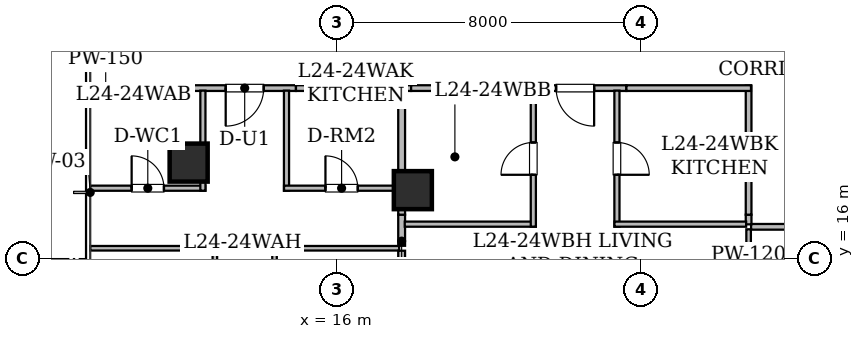
"""IFC4 building model, lengths in metres.
Left out: names, types, materials, properties, quantities, classifications, styles, units other than length and angle.
Written with IfcOpenShell. Run it as: python <this file> out.ifc"""

import sys

from ifc_helpers import new_model, si_unit, direction, frame, frame_2d, origin, origin_2d, place, context, subcontext, project, spatial, rectangle, hollow_rectangle, extrude, element, fill, save


model = new_model("IFC4")
c1 = context("Model", 3, precision=1e-05, world=origin(), true_north=direction((0.0, 1.0)))
c2 = subcontext(c1, "Body", "Model", "MODEL_VIEW")
j1 = project(units=[si_unit("LENGTHUNIT", "METRE"), si_unit("PLANEANGLEUNIT", "RADIAN")], contexts=[c1])
p1 = place(None, origin())
s1 = spatial("IfcSite", under=j1, at=p1, CompositionType="ELEMENT")
p2 = place(p1, origin())
s2 = spatial("IfcBuilding", under=s1, at=p2, CompositionType="ELEMENT")
p3 = place(p2, frame((0.0, 0.0, 98.25)))
s3 = spatial("IfcBuildingStorey", under=s2, at=p3, CompositionType="ELEMENT", Elevation=98.25)
for number, where, z_axis, x_axis in (
    (1, (12.1, 18.525, 0.0), (0.0, 0.0, 1.0), (1.0, 0.0, 0.0)),
    (2, (18.0, 17.8, 0.0), (0.0, 0.0, 1.0), (1.0, 0.0, 0.0)),
):
    element("IfcColumn", number, at=place(p3, frame(where, z_axis=z_axis, x_axis=x_axis)), inside=s3, PredefinedType="COLUMN", context=c2, shape_type="SweptSolid", body=[
        extrude(hollow_rectangle(XDim=1.0, YDim=1.0, WallThickness=0.05, at=origin_2d()), origin(), (0.0, 0.0, 1.0), 3.65),
    ])
p4 = place(p3, frame((34.114, 16.835, 0.0), z_axis=(0.0, 0.0, 1.0), x_axis=(-1.0, 0.0, 0.0)))
e3 = element("IfcWall", 3, at=p4, inside=s3, PredefinedType="STANDARD", context=c2, shape_type="SweptSolid", body=[
    extrude(rectangle(XDim=7.214, YDim=0.15, at=frame_2d((3.607, 0.0))), origin(), (0.0, 0.0, 1.0), 2.647),
])
p5 = place(p4, frame((3.053, 0.0, 0.0)))
e4 = element("IfcOpeningElement", 4, at=p5, cuts=e3, PredefinedType="OPENING", context=c2, shape_type="SweptSolid", body=[
    extrude(rectangle(XDim=1.15, YDim=2.2, at=frame_2d((0.575, 1.1))), frame((0.0, 0.085, 0.0), z_axis=(0.0, -1.0, 0.0), x_axis=(1.0, 0.0, 0.0)), (0.0, 0.0, 1.0), 0.17),
])
p6 = place(p3, frame((14.924, 20.485, 0.0), z_axis=(0.0, 0.0, 1.0), x_axis=(-1.0, 0.0, 0.0)))
e5 = element("IfcWall", 5, at=p6, inside=s3, PredefinedType="STANDARD", context=c2, shape_type="SweptSolid", body=[
    extrude(rectangle(XDim=2.698, YDim=0.15, at=frame_2d((1.349, 0.0))), origin(), (0.0, 0.0, 1.0), 3.43),
])
p7 = place(p6, frame((0.849, 0.0, 0.0)))
e6 = element("IfcOpeningElement", 6, at=p7, cuts=e5, PredefinedType="OPENING", context=c2, shape_type="SweptSolid", body=[
    extrude(rectangle(XDim=1.0, YDim=2.15, at=frame_2d((0.5, 1.075))), frame((0.0, 0.085, 0.0), z_axis=(0.0, -1.0, 0.0), x_axis=(1.0, 0.0, 0.0)), (0.0, 0.0, 1.0), 0.17),
])
p8 = place(p3, frame((12.226, 20.485, 0.0), z_axis=(0.0, 0.0, 1.0), x_axis=(-1.0, 0.0, 0.0)))
e7 = element("IfcWall", 7, at=p8, inside=s3, PredefinedType="STANDARD", context=c2, shape_type="SweptSolid", body=[
    extrude(rectangle(XDim=2.716, YDim=0.15, at=frame_2d((1.358, 0.0))), origin(), (0.0, 0.0, 1.0), 2.876),
])
p9 = place(p3, frame((17.954, 20.485, 0.0), z_axis=(0.0, 0.0, 1.0), x_axis=(-1.0, 0.0, 0.0)))
e8 = element("IfcWall", 8, at=p9, inside=s3, PredefinedType="STANDARD", context=c2, shape_type="SweptSolid", body=[
    extrude(rectangle(XDim=3.03, YDim=0.15, at=frame_2d((1.515, 0.0))), origin(), (0.0, 0.0, 1.0), 2.647),
])
p10 = place(p3, frame((26.835, 16.9, 0.0), z_axis=(0.0, 0.0, 1.0), x_axis=(0.0, 1.0, 0.0)))
e9 = element("IfcWall", 9, at=p10, inside=s3, PredefinedType="STANDARD", context=c2, shape_type="SweptSolid", body=[
    extrude(rectangle(XDim=0.254, YDim=0.15, at=frame_2d((0.127, 0.0))), origin(), (0.0, 0.0, 1.0), 3.43),
])
p11 = place(p3, frame((23.619, 20.485, 0.0), z_axis=(0.0, 0.0, 1.0), x_axis=(-1.0, 0.0, 0.0)))
e10 = element("IfcWall", 10, at=p11, inside=s3, PredefinedType="STANDARD", context=c2, shape_type="SweptSolid", body=[
    extrude(rectangle(XDim=2.698, YDim=0.15, at=frame_2d((1.349, 0.0))), origin(), (0.0, 0.0, 1.0), 3.43),
])
p12 = place(p11, frame((0.849, 0.0, 0.0)))
e11 = element("IfcOpeningElement", 11, at=p12, cuts=e10, PredefinedType="OPENING", context=c2, shape_type="SweptSolid", body=[
    extrude(rectangle(XDim=1.0, YDim=2.15, at=frame_2d((0.5, 1.075))), frame((0.0, 0.085, 0.0), z_axis=(0.0, -1.0, 0.0), x_axis=(1.0, 0.0, 0.0)), (0.0, 0.0, 1.0), 0.17),
])
p13 = place(p3, frame((20.921, 20.485, 0.0), z_axis=(0.0, 0.0, 1.0), x_axis=(-1.0, 0.0, 0.0)))
e12 = element("IfcWall", 12, at=p13, inside=s3, PredefinedType="STANDARD", context=c2, shape_type="SweptSolid", body=[
    extrude(rectangle(XDim=2.967, YDim=0.15, at=frame_2d((1.483, 0.0))), origin(), (0.0, 0.0, 1.0), 2.647),
])
p14 = place(p3, frame((26.835, 17.154, 0.0), z_axis=(0.0, 0.0, 1.0), x_axis=(0.0, 1.0, 0.0)))
e13 = element("IfcWall", 13, at=p14, inside=s3, PredefinedType="STANDARD", context=c2, shape_type="SweptSolid", body=[
    extrude(rectangle(XDim=3.396, YDim=0.15, at=frame_2d((1.698, 0.0))), origin(), (0.0, 0.0, 1.0), 2.647),
])
p15 = place(p3, frame((26.898, 20.485, 0.0), z_axis=(0.0, 0.0, 1.0), x_axis=(-1.0, 0.0, 0.0)))
e14 = element("IfcWall", 14, at=p15, inside=s3, PredefinedType="STANDARD", context=c2, shape_type="SweptSolid", body=[
    extrude(rectangle(XDim=3.279, YDim=0.15, at=frame_2d((1.64, 0.0))), origin(), (0.0, 0.0, 1.0), 3.43),
])
p16 = place(p3, frame((26.835, 15.076, 0.0), z_axis=(0.0, 0.0, 1.0), x_axis=(0.0, 1.0, 0.0)))
e15 = element("IfcWall", 15, at=p16, inside=s3, PredefinedType="PARTITIONING", context=c2, shape_type="SweptSolid", body=[
    extrude(rectangle(XDim=1.694, YDim=0.12, at=frame_2d((0.847, 0.0))), origin(), (0.0, 0.0, 1.0), 3.43),
])
p17 = place(p3, frame((9.51, 17.851, 0.0), z_axis=(0.0, 0.0, 1.0), x_axis=(1.0, 0.0, 0.0)))
e16 = element("IfcWall", 16, at=p17, inside=s3, PredefinedType="PARTITIONING", context=c2, shape_type="SweptSolid", body=[
    extrude(rectangle(XDim=3.03, YDim=0.135, at=frame_2d((1.515, 0.0))), origin(), (0.0, 0.0, 1.0), 2.876),
])
p18 = place(p17, frame((1.09, 0.0, 0.0)))
e17 = element("IfcOpeningElement", 17, at=p18, cuts=e16, PredefinedType="OPENING", context=c2, shape_type="SweptSolid", body=[
    extrude(rectangle(XDim=0.85, YDim=2.1, at=frame_2d((0.425, 1.05))), frame((0.0, 0.077, 0.0), z_axis=(0.0, -1.0, 0.0), x_axis=(1.0, 0.0, 0.0)), (0.0, 0.0, 1.0), 0.155),
])
for number, where, z_axis, x_axis in (
    (18, (12.475, 17.786, 0.0), (0.0, 0.0, 1.0), (0.0, 1.0, 0.0)),
    (19, (14.675, 20.418, 0.0), (0.0, 0.0, 1.0), (0.0, -1.0, 0.0)),
):
    element("IfcWall", number, at=place(p3, frame(where, z_axis=z_axis, x_axis=x_axis)), inside=s3, PredefinedType="PARTITIONING", context=c2, shape_type="SweptSolid", body=[
        extrude(rectangle(XDim=2.632, YDim=0.135, at=frame_2d((1.316, 0.0))), origin(), (0.0, 0.0, 1.0), 2.647),
    ])
p19 = place(p3, frame((14.61, 17.851, 0.0), z_axis=(0.0, 0.0, 1.0), x_axis=(1.0, 0.0, 0.0)))
e20 = element("IfcWall", 20, at=p19, inside=s3, PredefinedType="PARTITIONING", context=c2, shape_type="SweptSolid", body=[
    extrude(rectangle(XDim=3.03, YDim=0.135, at=frame_2d((1.515, 0.0))), origin(), (0.0, 0.0, 1.0), 2.647),
])
p20 = place(p19, frame((1.09, 0.0, 0.0)))
e21 = element("IfcOpeningElement", 21, at=p20, cuts=e20, PredefinedType="OPENING", context=c2, shape_type="SweptSolid", body=[
    extrude(rectangle(XDim=0.85, YDim=2.1, at=frame_2d((0.425, 1.05))), frame((0.0, 0.077, 0.0), z_axis=(0.0, -1.0, 0.0), x_axis=(1.0, 0.0, 0.0)), (0.0, 0.0, 1.0), 0.155),
])
p21 = place(p3, frame((12.79, 7.357, 0.0), z_axis=(0.0, 0.0, 1.0), x_axis=(0.0, 1.0, 0.0)))
e22 = element("IfcWall", 22, at=p21, inside=s3, PredefinedType="PARTITIONING", context=c2, shape_type="SweptSolid", body=[
    extrude(rectangle(XDim=8.979, YDim=0.12, at=frame_2d((4.49, 0.0))), origin(), (0.0, 0.0, 1.0), 2.876),
])
p22 = place(p21, frame((4.039, 0.0, 0.0)))
e23 = element("IfcOpeningElement", 23, at=p22, cuts=e22, PredefinedType="OPENING", context=c2, shape_type="SweptSolid", body=[
    extrude(rectangle(XDim=0.9, YDim=2.1, at=frame_2d((0.45, 1.05))), frame((0.0, 0.07, 0.0), z_axis=(0.0, -1.0, 0.0), x_axis=(1.0, 0.0, 0.0)), (0.0, 0.0, 1.0), 0.14),
])
p23 = place(p3, frame((12.855, 16.271, 0.0), z_axis=(0.0, 0.0, 1.0), x_axis=(-1.0, 0.0, 0.0)))
e24 = element("IfcWall", 24, at=p23, inside=s3, PredefinedType="PARTITIONING", context=c2, shape_type="SweptSolid", body=[
    extrude(rectangle(XDim=3.345, YDim=0.12, at=frame_2d((1.672, 0.0))), origin(), (0.0, 0.0, 1.0), 3.43),
])
p24 = place(p3, frame((14.36, 16.336, 0.0), z_axis=(0.0, 0.0, 1.0), x_axis=(0.0, -1.0, 0.0)))
e25 = element("IfcWall", 25, at=p24, inside=s3, PredefinedType="PARTITIONING", context=c2, shape_type="SweptSolid", body=[
    extrude(rectangle(XDim=9.724, YDim=0.12, at=frame_2d((4.862, 0.0))), origin(), (0.0, 0.0, 1.0), 2.876),
])
p25 = place(p24, frame((4.412, 0.0, 0.0)))
e26 = element("IfcOpeningElement", 26, at=p25, cuts=e25, PredefinedType="OPENING", context=c2, shape_type="SweptSolid", body=[
    extrude(rectangle(XDim=0.9, YDim=2.1, at=frame_2d((0.45, 1.05))), frame((0.0, 0.07, 0.0), z_axis=(0.0, -1.0, 0.0), x_axis=(1.0, 0.0, 0.0)), (0.0, 0.0, 1.0), 0.14),
])
p26 = place(p3, frame((17.64, 16.271, 0.0), z_axis=(0.0, 0.0, 1.0), x_axis=(-1.0, 0.0, 0.0)))
e27 = element("IfcWall", 27, at=p26, inside=s3, PredefinedType="PARTITIONING", context=c2, shape_type="SweptSolid", body=[
    extrude(rectangle(XDim=3.345, YDim=0.12, at=frame_2d((1.672, 0.0))), origin(), (0.0, 0.0, 1.0), 2.647),
])
p27 = place(p3, frame((17.705, 17.154, 0.0), z_axis=(0.0, 0.0, 1.0), x_axis=(0.0, -1.0, 0.0)))
e28 = element("IfcWall", 28, at=p27, inside=s3, PredefinedType="STANDARD", context=c2, shape_type="SweptSolid", body=[
    extrude(rectangle(XDim=0.818, YDim=0.18, at=frame_2d((0.409, 0.0))), origin(), (0.0, 0.0, 1.0), 2.647),
])
p28 = place(p3, frame((17.705, 17.786, 0.0), z_axis=(0.0, 0.0, 1.0), x_axis=(0.0, -1.0, 0.0)))
e29 = element("IfcWall", 29, at=p28, inside=s3, PredefinedType="STANDARD", context=c2, shape_type="SweptSolid", body=[
    extrude(rectangle(XDim=0.632, YDim=0.18, at=frame_2d((0.316, 0.0))), origin(), (0.0, 0.0, 1.0), 2.647),
])
p29 = place(p3, frame((17.705, 20.418, 0.0), z_axis=(0.0, 0.0, 1.0), x_axis=(0.0, -1.0, 0.0)))
e30 = element("IfcWall", 30, at=p29, inside=s3, PredefinedType="STANDARD", context=c2, shape_type="SweptSolid", body=[
    extrude(rectangle(XDim=2.502, YDim=0.18, at=frame_2d((1.251, 0.0))), origin(), (0.0, 0.0, 1.0), 2.647),
])
p30 = place(p3, frame((17.705, 16.206, 0.0), z_axis=(0.0, 0.0, 1.0), x_axis=(0.0, -1.0, 0.0)))
e31 = element("IfcWall", 31, at=p30, inside=s3, PredefinedType="STANDARD", context=c2, shape_type="SweptSolid", body=[
    extrude(rectangle(XDim=1.13, YDim=0.18, at=frame_2d((0.565, 0.0))), origin(), (0.0, 0.0, 1.0), 2.647),
])
p31 = place(p3, frame((17.787, 16.905, 0.0), z_axis=(0.0, 0.0, 1.0), x_axis=(1.0, 0.0, 0.0)))
e32 = element("IfcWall", 32, at=p31, inside=s3, PredefinedType="PARTITIONING", context=c2, shape_type="SweptSolid", body=[
    extrude(rectangle(XDim=3.448, YDim=0.135, at=frame_2d((1.724, 0.0))), origin(), (0.0, 0.0, 1.0), 2.647),
])
p32 = place(p3, frame((21.17, 16.84, 0.0), z_axis=(0.0, 0.0, 1.0), x_axis=(0.0, 1.0, 0.0)))
e33 = element("IfcWall", 33, at=p32, inside=s3, PredefinedType="PARTITIONING", context=c2, shape_type="SweptSolid", body=[
    extrude(rectangle(XDim=3.578, YDim=0.135, at=frame_2d((1.789, 0.0))), origin(), (0.0, 0.0, 1.0), 2.647),
])
p33 = place(p32, frame((1.364, 0.0, 0.0)))
e34 = element("IfcOpeningElement", 34, at=p33, cuts=e33, PredefinedType="OPENING", context=c2, shape_type="SweptSolid", body=[
    extrude(rectangle(XDim=0.85, YDim=2.1, at=frame_2d((0.425, 1.05))), frame((0.0, 0.077, 0.0), z_axis=(0.0, -1.0, 0.0), x_axis=(1.0, 0.0, 0.0)), (0.0, 0.0, 1.0), 0.155),
])
p34 = place(p3, frame((23.37, 20.418, 0.0), z_axis=(0.0, 0.0, 1.0), x_axis=(0.0, -1.0, 0.0)))
e35 = element("IfcWall", 35, at=p34, inside=s3, PredefinedType="PARTITIONING", context=c2, shape_type="SweptSolid", body=[
    extrude(rectangle(XDim=3.578, YDim=0.135, at=frame_2d((1.789, 0.0))), origin(), (0.0, 0.0, 1.0), 2.647),
])
p35 = place(p34, frame((1.364, 0.0, 0.0)))
e36 = element("IfcOpeningElement", 36, at=p35, cuts=e35, PredefinedType="OPENING", context=c2, shape_type="SweptSolid", body=[
    extrude(rectangle(XDim=0.85, YDim=2.1, at=frame_2d((0.425, 1.05))), frame((0.0, 0.077, 0.0), z_axis=(0.0, -1.0, 0.0), x_axis=(1.0, 0.0, 0.0)), (0.0, 0.0, 1.0), 0.155),
])
p36 = place(p3, frame((23.305, 16.905, 0.0), z_axis=(0.0, 0.0, 1.0), x_axis=(1.0, 0.0, 0.0)))
e37 = element("IfcWall", 37, at=p36, inside=s3, PredefinedType="PARTITIONING", context=c2, shape_type="SweptSolid", body=[
    extrude(rectangle(XDim=3.465, YDim=0.135, at=frame_2d((1.732, 0.0))), origin(), (0.0, 0.0, 1.0), 3.43),
])
p37 = place(p7, origin())
e38 = element("IfcDoor", 38, at=p37, inside=s3, OperationType="SINGLE_SWING_RIGHT", PredefinedType="DOOR", context=c2, shape_type="SweptSolid", body=[
    extrude(rectangle(XDim=1.0, YDim=2.15, at=frame_2d((0.5, 1.075))), frame((0.0, 0.025, 0.0), z_axis=(0.0, -1.0, 0.0), x_axis=(1.0, 0.0, 0.0)), (0.0, 0.0, 1.0), 0.05),
])
fill(e6, e38)
p38 = place(p12, origin())
e39 = element("IfcDoor", 39, at=p38, inside=s3, OperationType="SINGLE_SWING_LEFT", PredefinedType="DOOR", context=c2, shape_type="SweptSolid", body=[
    extrude(rectangle(XDim=1.0, YDim=2.15, at=frame_2d((0.5, 1.075))), frame((0.0, 0.025, 0.0), z_axis=(0.0, -1.0, 0.0), x_axis=(1.0, 0.0, 0.0)), (0.0, 0.0, 1.0), 0.05),
])
fill(e11, e39)
p39 = place(p18, origin())
e40 = element("IfcDoor", 40, at=p39, inside=s3, OperationType="SINGLE_SWING_LEFT", PredefinedType="DOOR", context=c2, shape_type="SweptSolid", body=[
    extrude(rectangle(XDim=0.85, YDim=2.1, at=frame_2d((0.425, 1.05))), frame((0.0, 0.025, 0.0), z_axis=(0.0, -1.0, 0.0), x_axis=(1.0, 0.0, 0.0)), (0.0, 0.0, 1.0), 0.05),
])
fill(e17, e40)
p40 = place(p20, origin())
e41 = element("IfcDoor", 41, at=p40, inside=s3, OperationType="SINGLE_SWING_LEFT", PredefinedType="DOOR", context=c2, shape_type="SweptSolid", body=[
    extrude(rectangle(XDim=0.85, YDim=2.1, at=frame_2d((0.425, 1.05))), frame((0.0, 0.025, 0.0), z_axis=(0.0, -1.0, 0.0), x_axis=(1.0, 0.0, 0.0)), (0.0, 0.0, 1.0), 0.05),
])
fill(e21, e41)
p41 = place(p33, origin())
e42 = element("IfcDoor", 42, at=p41, inside=s3, OperationType="SINGLE_SWING_LEFT", PredefinedType="DOOR", context=c2, shape_type="SweptSolid", body=[
    extrude(rectangle(XDim=0.85, YDim=2.1, at=frame_2d((0.425, 1.05))), frame((0.0, 0.025, 0.0), z_axis=(0.0, -1.0, 0.0), x_axis=(1.0, 0.0, 0.0)), (0.0, 0.0, 1.0), 0.05),
])
fill(e34, e42)
p42 = place(p35, origin())
e43 = element("IfcDoor", 43, at=p42, inside=s3, OperationType="SINGLE_SWING_RIGHT", PredefinedType="DOOR", context=c2, shape_type="SweptSolid", body=[
    extrude(rectangle(XDim=0.85, YDim=2.1, at=frame_2d((0.425, 1.05))), frame((0.0, 0.025, 0.0), z_axis=(0.0, -1.0, 0.0), x_axis=(1.0, 0.0, 0.0)), (0.0, 0.0, 1.0), 0.05),
])
fill(e36, e43)
save(model, sys.argv[1])
